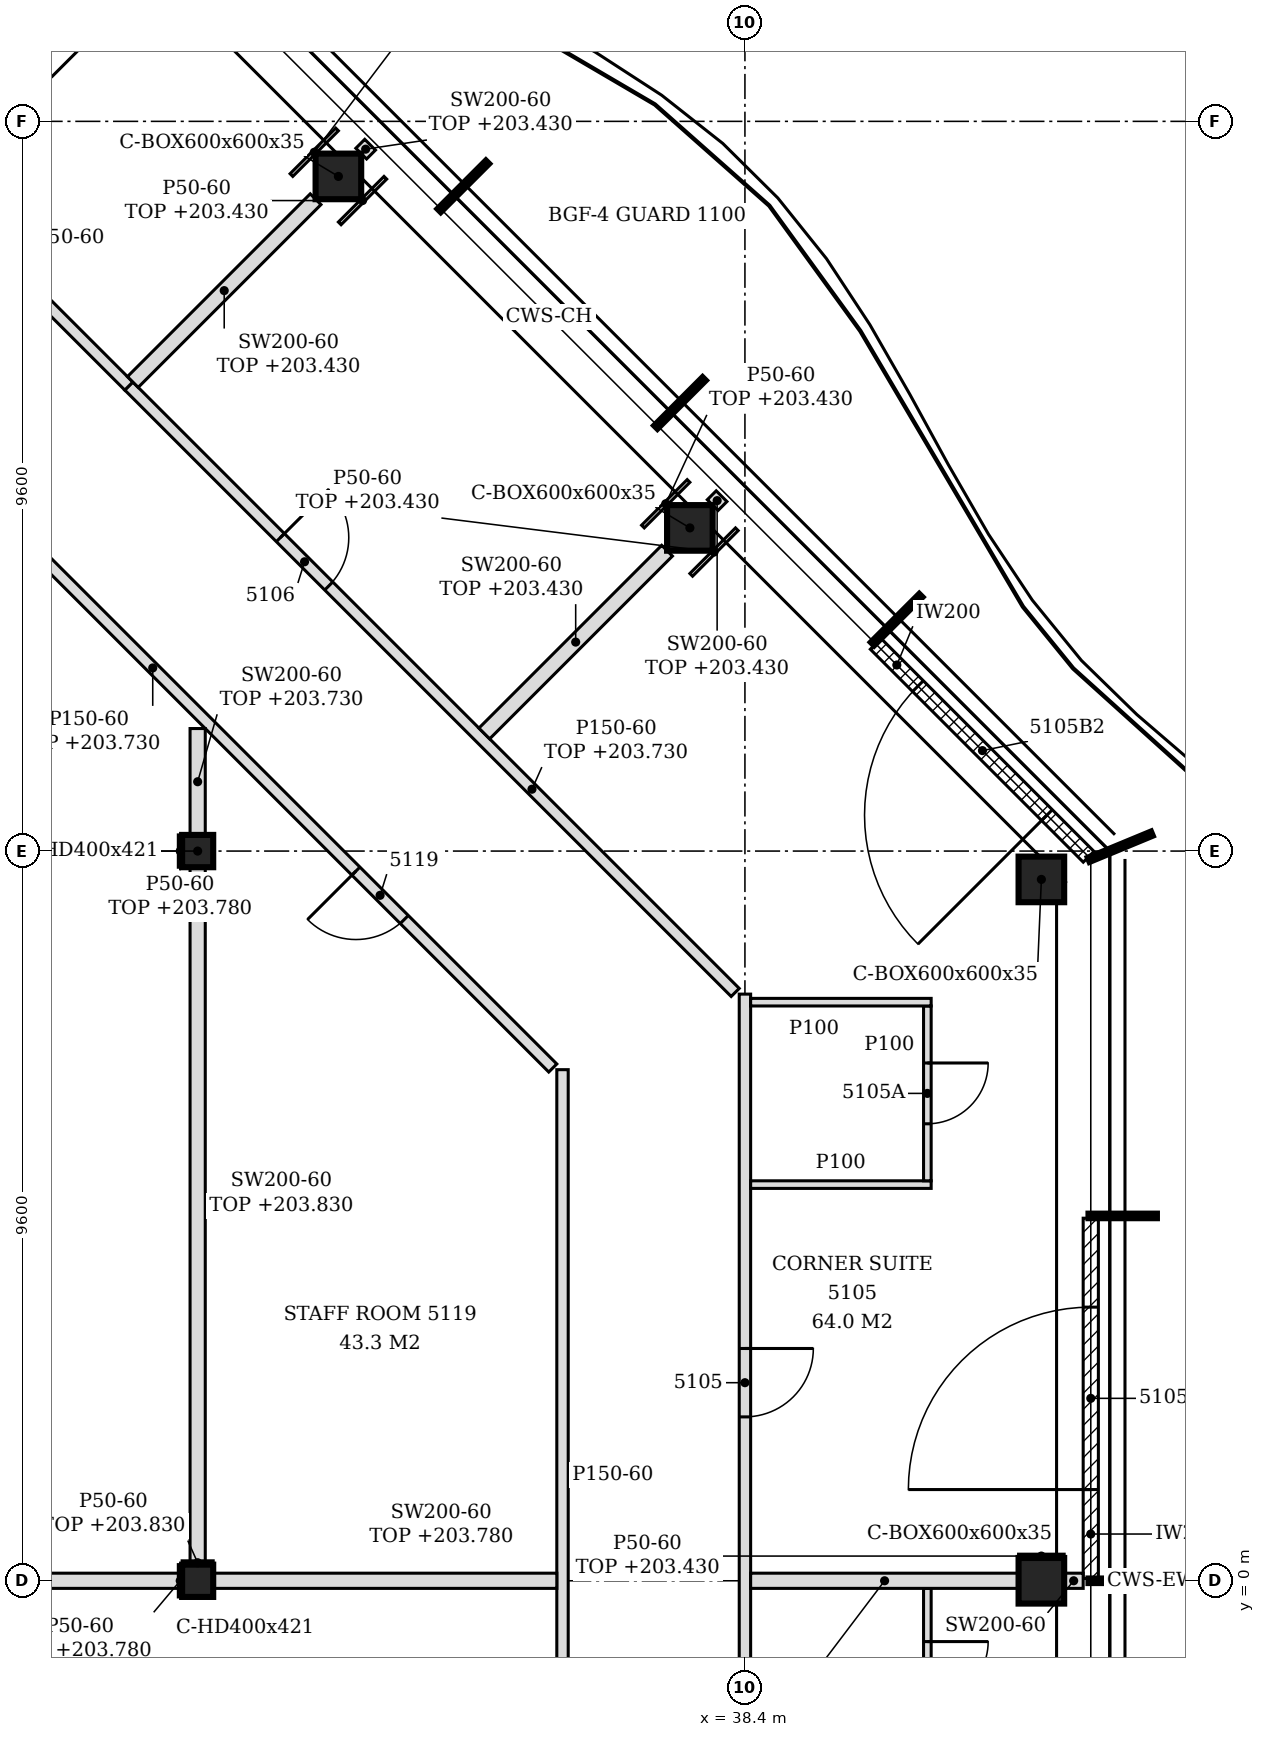
"""IFC4 building model, lengths in metres.
Left out: names, types, materials, properties, quantities, classifications, styles, units other than length and angle.
Written with IfcOpenShell. Run it as: python <this file> out.ifc"""

import sys

from ifc_helpers import new_model, si_unit, direction, frame, frame_2d, origin, origin_2d, place, context, subcontext, project, spatial, polyline, rectangle, hollow_rectangle, i_section, outline, extrude, clip, halfspace, element, fill, save


model = new_model("IFC4")
c1 = context("Model", 3, precision=1e-05, world=origin(), true_north=direction((0.0, 1.0)))
c2 = subcontext(c1, "Body", "Model", "MODEL_VIEW")
j1 = project(units=[si_unit("LENGTHUNIT", "METRE"), si_unit("PLANEANGLEUNIT", "RADIAN")], contexts=[c1])
p1 = place(None, origin())
s1 = spatial("IfcSite", under=j1, at=p1, CompositionType="ELEMENT")
p2 = place(p1, origin())
s2 = spatial("IfcBuilding", under=s1, at=p2, CompositionType="ELEMENT")
p3 = place(p2, frame((0.0, 0.0, 201.0)))
s3 = spatial("IfcBuildingStorey", under=s2, at=p3, CompositionType="ELEMENT", Elevation=201.0)
p4 = place(p3, frame((42.3, 0.0, -0.15), z_axis=(0.0, 0.0, 1.0), x_axis=(1.0, 0.0, 0.0)))
e1 = element("IfcColumn", 1, at=p4, inside=s3, PredefinedType="COLUMN", context=c2, shape_type="Clipping", body=[
    clip(extrude(hollow_rectangle(XDim=0.6, YDim=0.6, WallThickness=0.035, at=origin_2d()), origin(), (0.0, 0.0, 1.0), 3.5), halfspace(frame((0.0, 0.0, 0.011), z_axis=(0.0, 0.0, 1.0), x_axis=(1.0, 0.0, 0.0)), True)),
])
for number, where, z_axis, x_axis in (
    (2, (42.3, 9.227, -0.15), (0.0, 0.0, 1.0), (1.0, 0.0, 0.0)),
    (3, (37.676, 13.852, -0.15), (0.0, 0.0, 1.0), (1.0, 0.0, 0.0)),
    (4, (33.052, 18.476, -0.15), (0.0, 0.0, 1.0), (1.0, 0.0, 0.0)),
):
    element("IfcColumn", number, at=place(p3, frame(where, z_axis=z_axis, x_axis=x_axis)), inside=s3, PredefinedType="COLUMN", context=c2, shape_type="Clipping", body=[
        clip(clip(extrude(hollow_rectangle(XDim=0.6, YDim=0.6, WallThickness=0.035, at=origin_2d()), origin(), (0.0, 0.0, 1.0), 3.5), halfspace(frame((0.0, 0.0, 0.011), z_axis=(0.0, 0.0, 1.0), x_axis=(1.0, 0.0, 0.0)), True)), halfspace(frame((0.0, 0.0, 3.095), z_axis=(0.0, 0.0, 1.0), x_axis=(1.0, 0.0, 0.0)), False)),
    ])
for number, where, z_axis, x_axis in (
    (5, (31.2, 0.0, -0.15), (0.0, 0.0, 1.0), (1.0, 0.0, 0.0)),
    (6, (31.2, 9.6, -0.15), (0.0, 0.0, 1.0), (1.0, 0.0, 0.0)),
):
    element("IfcColumn", number, at=place(p3, frame(where, z_axis=z_axis, x_axis=x_axis)), inside=s3, PredefinedType="COLUMN", context=c2, shape_type="SweptSolid", body=[
        extrude(i_section(OverallWidth=0.409, OverallDepth=0.425, WebThickness=0.033, FlangeThickness=0.052, FilletRadius=0.015, at=origin_2d()), origin(), (0.0, 0.0, 1.0), 3.5),
    ])
p5 = place(p3, frame((42.95, 0.03, 0.0), z_axis=(0.0, 0.0, 1.0), x_axis=(0.0, 1.0, 0.0)))
e7 = element("IfcWall", 7, at=p5, inside=s3, PredefinedType="NOTDEFINED", context=c2, shape_type="SweptSolid", body=[
    extrude(rectangle(XDim=4.74, YDim=0.2, at=frame_2d((2.37, 0.0))), origin(), (0.0, 0.0, 1.0), 3.35),
])
p6 = place(p5, frame((1.17, 0.0, 0.0)))
e8 = element("IfcOpeningElement", 8, at=p6, cuts=e7, PredefinedType="OPENING", context=c2, shape_type="SweptSolid", body=[
    extrude(rectangle(XDim=2.4, YDim=2.4, at=frame_2d((1.2, 1.2))), frame((0.0, 0.11, 0.0), z_axis=(0.0, -1.0, 0.0), x_axis=(1.0, 0.0, 0.0)), (0.0, 0.0, 1.0), 0.22),
])
p7 = place(p3, frame((42.922, 9.525, 0.0), z_axis=(0.0, 0.0, 1.0), x_axis=(-0.707075965734, 0.707137595296, 0.0)))
e9 = element("IfcWall", 9, at=p7, inside=s3, PredefinedType="NOTDEFINED", context=c2, shape_type="SweptSolid", body=[
    extrude(rectangle(XDim=3.961, YDim=0.2, at=frame_2d((1.981, 0.0))), origin(), (0.0, 0.0, 1.0), 3.35),
])
p8 = place(p7, frame((0.775, 0.0, 0.0)))
e10 = element("IfcOpeningElement", 10, at=p8, cuts=e9, PredefinedType="OPENING", context=c2, shape_type="SweptSolid", body=[
    extrude(rectangle(XDim=2.4, YDim=2.4, at=frame_2d((1.2, 1.2))), frame((0.0, 0.11, 0.0), z_axis=(0.0, -1.0, 0.0), x_axis=(1.0, 0.0, 0.0)), (0.0, 0.0, 1.0), 0.22),
])
p9 = place(p3, frame((38.4, -7.431, 0.0), z_axis=(0.0, 0.0, 1.0), x_axis=(0.0, 1.0, 0.0)))
e11 = element("IfcWall", 11, at=p9, inside=s3, PredefinedType="PARTITIONING", context=c2, shape_type="SweptSolid", body=[
    extrude(outline(polyline([(0.0, 0.0), (15.149, 0.0), (15.149, 3.35), (12.336, 3.35), (12.334, 2.78), (12.126, 2.78), (12.124, 3.35), (7.536, 3.35), (7.534, 2.78), (7.326, 2.78), (7.324, 3.35), (2.736, 3.35), (2.734, 2.78), (2.526, 2.78), (2.524, 3.35), (0.0, 3.35), (0.0, 0.0)])), frame((0.0, 0.075, 0.0), z_axis=(0.0, -1.0, 0.0), x_axis=(1.0, 0.0, 0.0)), (0.0, 0.0, 1.0), 0.15),
])
p10 = place(p9, frame((1.975, 0.0, 0.0)))
e12 = element("IfcOpeningElement", 12, at=p10, cuts=e11, PredefinedType="OPENING", context=c2, shape_type="SweptSolid", body=[
    extrude(rectangle(XDim=0.9, YDim=2.1, at=frame_2d((0.45, 1.05))), frame((0.0, 0.085, 0.0), z_axis=(0.0, -1.0, 0.0), x_axis=(1.0, 0.0, 0.0)), (0.0, 0.0, 1.0), 0.17),
])
p11 = place(p9, frame((9.587, 0.0, 0.0)))
e13 = element("IfcOpeningElement", 13, at=p11, cuts=e11, PredefinedType="OPENING", context=c2, shape_type="SweptSolid", body=[
    extrude(rectangle(XDim=0.9, YDim=2.1, at=frame_2d((0.45, 1.05))), frame((0.0, 0.085, 0.0), z_axis=(0.0, -1.0, 0.0), x_axis=(1.0, 0.0, 0.0)), (0.0, 0.0, 1.0), 0.17),
])
p12 = place(p3, frame((36.0, -5.925, 0.0), z_axis=(0.0, 0.0, 1.0), x_axis=(0.0, 1.0, 0.0)))
e14 = element("IfcWall", 14, at=p12, inside=s3, PredefinedType="PARTITIONING", context=c2, shape_type="SweptSolid", body=[
    extrude(outline(polyline([(0.0, 0.0), (12.649, 0.0), (12.649, 3.35), (10.83, 3.35), (10.828, 2.78), (10.62, 2.78), (10.618, 3.35), (6.03, 3.35), (6.028, 2.78), (5.82, 2.78), (5.818, 3.35), (1.23, 3.35), (1.228, 2.78), (1.02, 2.78), (1.018, 3.35), (0.0, 3.35), (0.0, 0.0)])), frame((0.0, 0.075, 0.0), z_axis=(0.0, -1.0, 0.0), x_axis=(1.0, 0.0, 0.0)), (0.0, 0.0, 1.0), 0.15),
])
p13 = place(p12, frame((1.175, 0.0, 0.0)))
e15 = element("IfcOpeningElement", 15, at=p13, cuts=e14, PredefinedType="OPENING", context=c2, shape_type="SweptSolid", body=[
    extrude(rectangle(XDim=0.8, YDim=2.1, at=frame_2d((0.4, 1.05))), frame((0.0, 0.085, 0.0), z_axis=(0.0, -1.0, 0.0), x_axis=(1.0, 0.0, 0.0)), (0.0, 0.0, 1.0), 0.17),
])
p14 = place(p3, frame((40.8, -2.35, 0.0), z_axis=(0.0, 0.0, 1.0), x_axis=(0.0, 1.0, 0.0)))
e16 = element("IfcWall", 16, at=p14, inside=s3, PredefinedType="PARTITIONING", context=c2, shape_type="SweptSolid", body=[
    extrude(outline(polyline([(0.0, 0.0), (2.25, 0.0), (2.25, 2.78), (2.245, 2.78), (2.243, 3.35), (0.0, 3.35), (0.0, 0.0)])), frame((0.0, 0.05, 0.0), z_axis=(0.0, -1.0, 0.0), x_axis=(1.0, 0.0, 0.0)), (0.0, 0.0, 1.0), 0.1),
])
p15 = place(p14, frame((0.75, 0.0, 0.0)))
e17 = element("IfcOpeningElement", 17, at=p15, cuts=e16, PredefinedType="OPENING", context=c2, shape_type="SweptSolid", body=[
    extrude(rectangle(XDim=0.8, YDim=2.1, at=frame_2d((0.4, 1.05))), frame((0.0, 0.06, 0.0), z_axis=(0.0, -1.0, 0.0), x_axis=(1.0, 0.0, 0.0)), (0.0, 0.0, 1.0), 0.12),
])
p16 = place(p3, frame((19.275, 0.0, 0.0), z_axis=(0.0, 0.0, 1.0), x_axis=(1.0, 0.0, 0.0)))
e18 = element("IfcWall", 18, at=p16, inside=s3, PredefinedType="PARTITIONING", context=c2, shape_type="SweptSolid", body=[
    extrude(outline(polyline([(0.0, 0.0), (11.721, 0.0), (11.72, 2.78), (0.076, 2.78), (0.074, 2.322), (0.0, 2.322), (0.0, 0.0)])), frame((0.0, 0.1, 0.0), z_axis=(0.0, -1.0, 0.0), x_axis=(1.0, 0.0, 0.0)), (0.0, 0.0, 1.0), 0.2),
])
p17 = place(p3, frame((31.405, 0.0, 0.0), z_axis=(0.0, 0.0, 1.0), x_axis=(1.0, 0.0, 0.0)))
e19 = element("IfcWall", 19, at=p17, inside=s3, PredefinedType="PARTITIONING", context=c2, shape_type="SweptSolid", body=[
    extrude(rectangle(XDim=4.521, YDim=0.2, at=frame_2d((2.26, 0.0))), origin(), (0.0, 0.0, 1.0), 2.78),
])
p18 = place(p3, frame((38.475, 0.0, 0.0), z_axis=(0.0, 0.0, 1.0), x_axis=(1.0, 0.0, 0.0)))
e20 = element("IfcWall", 20, at=p18, inside=s3, PredefinedType="PARTITIONING", context=c2, shape_type="SweptSolid", body=[
    extrude(outline(polyline([(0.0, 0.0), (3.525, 0.0), (3.525, 2.43), (3.375, 2.43), (3.373, 2.78), (0.0, 2.78), (0.0, 0.0)])), frame((0.0, 0.1, 0.0), z_axis=(0.0, -1.0, 0.0), x_axis=(1.0, 0.0, 0.0)), (0.0, 0.0, 1.0), 0.2),
])
p19 = place(p3, frame((42.6, 0.0, 0.0), z_axis=(0.0, 0.0, 1.0), x_axis=(1.0, 0.0, 0.0)))
e21 = element("IfcWall", 21, at=p19, inside=s3, PredefinedType="PARTITIONING", context=c2, shape_type="SweptSolid", body=[
    extrude(outline(polyline([(0.0, 0.0), (0.25, 0.0), (0.25, 3.35), (0.15, 3.35), (0.148, 2.43), (0.0, 2.43), (0.0, 0.0)])), frame((0.0, 0.1, 0.0), z_axis=(0.0, -1.0, 0.0), x_axis=(1.0, 0.0, 0.0)), (0.0, 0.0, 1.0), 0.2),
])
p20 = place(p3, frame((31.2, 0.212, 0.0), z_axis=(0.0, 0.0, 1.0), x_axis=(0.0, 1.0, 0.0)))
e22 = element("IfcWall", 22, at=p20, inside=s3, PredefinedType="PARTITIONING", context=c2, shape_type="SweptSolid", body=[
    extrude(rectangle(XDim=9.175, YDim=0.2, at=frame_2d((4.587, 0.0))), origin(), (0.0, 0.0, 1.0), 2.83),
])
p21 = place(p3, frame((38.475, 5.212, 0.0), z_axis=(0.0, 0.0, 1.0), x_axis=(1.0, 0.0, 0.0)))
e23 = element("IfcWall", 23, at=p21, inside=s3, PredefinedType="PARTITIONING", context=c2, shape_type="SweptSolid", body=[
    extrude(rectangle(XDim=2.375, YDim=0.1, at=frame_2d((1.188, 0.0))), origin(), (0.0, 0.0, 1.0), 3.35),
])
p22 = place(p3, frame((40.8, 5.262, 0.0), z_axis=(0.0, 0.0, 1.0), x_axis=(0.0, 1.0, 0.0)))
e24 = element("IfcWall", 24, at=p22, inside=s3, PredefinedType="PARTITIONING", context=c2, shape_type="SweptSolid", body=[
    extrude(rectangle(XDim=2.3, YDim=0.1, at=frame_2d((1.15, 0.0))), origin(), (0.0, 0.0, 1.0), 3.35),
])
p23 = place(p22, frame((0.75, 0.0, 0.0)))
e25 = element("IfcOpeningElement", 25, at=p23, cuts=e24, PredefinedType="OPENING", context=c2, shape_type="SweptSolid", body=[
    extrude(rectangle(XDim=0.8, YDim=2.1, at=frame_2d((0.4, 1.05))), frame((0.0, 0.06, 0.0), z_axis=(0.0, -1.0, 0.0), x_axis=(1.0, 0.0, 0.0)), (0.0, 0.0, 1.0), 0.12),
])
p24 = place(p3, frame((35.872, 6.746, 0.0), z_axis=(0.0, 0.0, 1.0), x_axis=(-0.707106781187, 0.707106781187, 0.0)))
e26 = element("IfcWall", 26, at=p24, inside=s3, PredefinedType="PARTITIONING", context=c2, shape_type="SweptSolid", body=[
    extrude(rectangle(XDim=14.038, YDim=0.15, at=frame_2d((7.019, 0.0))), origin(), (0.0, 0.0, 1.0), 2.73),
])
p25 = place(p24, frame((2.763, 0.0, 0.0)))
e27 = element("IfcOpeningElement", 27, at=p25, cuts=e26, PredefinedType="OPENING", context=c2, shape_type="SweptSolid", body=[
    extrude(rectangle(XDim=0.9, YDim=2.1, at=frame_2d((0.45, 1.05))), frame((0.0, 0.085, 0.0), z_axis=(0.0, -1.0, 0.0), x_axis=(1.0, 0.0, 0.0)), (0.0, 0.0, 1.0), 0.17),
])
p26 = place(p24, frame((11.223, 0.0, 0.0)))
e28 = element("IfcOpeningElement", 28, at=p26, cuts=e26, PredefinedType="OPENING", context=c2, shape_type="SweptSolid", body=[
    extrude(rectangle(XDim=0.9, YDim=2.1, at=frame_2d((0.45, 1.05))), frame((0.0, 0.085, 0.0), z_axis=(0.0, -1.0, 0.0), x_axis=(1.0, 0.0, 0.0)), (0.0, 0.0, 1.0), 0.17),
])
p27 = place(p3, frame((38.475, 7.612, 0.0), z_axis=(0.0, 0.0, 1.0), x_axis=(1.0, 0.0, 0.0)))
e29 = element("IfcWall", 29, at=p27, inside=s3, PredefinedType="PARTITIONING", context=c2, shape_type="SweptSolid", body=[
    extrude(rectangle(XDim=2.375, YDim=0.1, at=frame_2d((1.188, 0.0))), origin(), (0.0, 0.0, 1.0), 3.35),
])
p28 = place(p3, frame((38.272, 7.74, 0.0), z_axis=(0.0, 0.0, 1.0), x_axis=(-0.707106781187, 0.707106781187, 0.0)))
e30 = element("IfcWall", 30, at=p28, inside=s3, PredefinedType="PARTITIONING", context=c2, shape_type="SweptSolid", body=[
    extrude(rectangle(XDim=11.283, YDim=0.15, at=frame_2d((5.641, 0.0))), origin(), (0.0, 0.0, 1.0), 2.73),
])
p29 = place(p28, frame((7.562, 0.0, 0.0)))
e31 = element("IfcOpeningElement", 31, at=p29, cuts=e30, PredefinedType="OPENING", context=c2, shape_type="SweptSolid", body=[
    extrude(rectangle(XDim=0.9, YDim=2.1, at=frame_2d((0.45, 1.05))), frame((0.0, 0.085, 0.0), z_axis=(0.0, -1.0, 0.0), x_axis=(1.0, 0.0, 0.0)), (0.0, 0.0, 1.0), 0.17),
])
p30 = place(p3, frame((31.2, 9.812, 0.0), z_axis=(0.0, 0.0, 1.0), x_axis=(0.0, 1.0, 0.0)))
e32 = element("IfcWall", 32, at=p30, inside=s3, PredefinedType="PARTITIONING", context=c2, shape_type="SweptSolid", body=[
    extrude(rectangle(XDim=1.399, YDim=0.2, at=frame_2d((0.7, 0.0))), origin(), (0.0, 0.0, 1.0), 2.73),
])
p31 = place(p3, frame((34.971, 11.147, 0.0), z_axis=(0.0, 0.0, 1.0), x_axis=(0.707106781187, 0.707106781187, 0.0)))
e33 = element("IfcWall", 33, at=p31, inside=s3, PredefinedType="PARTITIONING", context=c2, shape_type="SweptSolid", body=[
    extrude(rectangle(XDim=3.401, YDim=0.2, at=frame_2d((1.7, 0.0))), origin(), (0.0, 0.0, 1.0), 2.43),
])
p32 = place(p3, frame((37.976, 14.152, 0.0), z_axis=(0.0, 0.0, 1.0), x_axis=(0.707106781187, 0.707106781187, 0.0)))
e34 = element("IfcWall", 34, at=p32, inside=s3, PredefinedType="PARTITIONING", context=c2, shape_type="SweptSolid", body=[
    extrude(rectangle(XDim=0.166, YDim=0.2, at=frame_2d((0.083, 0.0))), origin(), (0.0, 0.0, 1.0), 2.43),
])
p33 = place(p3, frame((30.294, 15.718, 0.0), z_axis=(0.0, 0.0, 1.0), x_axis=(-0.707229938335, 0.706983602584, 0.0)))
e35 = element("IfcWall", 35, at=p33, inside=s3, PredefinedType="PARTITIONING", context=c2, shape_type="SweptSolid", body=[
    extrude(rectangle(XDim=3.964, YDim=0.15, at=frame_2d((1.982, 0.0))), origin(), (0.0, 0.0, 1.0), 3.35),
])
p34 = place(p3, frame((30.347, 15.771, 0.0), z_axis=(0.0, 0.0, 1.0), x_axis=(0.707142675843, 0.707070884708, 0.0)))
e36 = element("IfcWall", 36, at=p34, inside=s3, PredefinedType="PARTITIONING", context=c2, shape_type="SweptSolid", body=[
    extrude(rectangle(XDim=3.401, YDim=0.2, at=frame_2d((1.7, 0.0))), origin(), (0.0, 0.0, 1.0), 2.43),
])
p35 = place(p3, frame((33.352, 18.776, 0.0), z_axis=(0.0, 0.0, 1.0), x_axis=(0.707106781187, 0.707106781187, 0.0)))
e37 = element("IfcWall", 37, at=p35, inside=s3, PredefinedType="PARTITIONING", context=c2, shape_type="SweptSolid", body=[
    extrude(rectangle(XDim=0.166, YDim=0.2, at=frame_2d((0.083, 0.0))), origin(), (0.0, 0.0, 1.0), 2.43),
])
p36 = place(p3, frame((30.996, 0.238, 0.0), z_axis=(0.0, 0.0, 1.0), x_axis=(1.0, 0.0, 0.0)))
e38 = element("IfcWall", 38, at=p36, inside=s3, PredefinedType="PARTITIONING", context=c2, shape_type="SweptSolid", body=[
    extrude(rectangle(XDim=0.409, YDim=0.05, at=frame_2d((0.205, 0.0))), origin(), (0.0, 0.0, 1.0), 2.83),
])
p37 = place(p3, frame((42.0, 0.325, 0.0), z_axis=(0.0, 0.0, 1.0), x_axis=(1.0, 0.0, 0.0)))
e39 = element("IfcWall", 39, at=p37, inside=s3, PredefinedType="PARTITIONING", context=c2, shape_type="SweptSolid", body=[
    extrude(rectangle(XDim=0.6, YDim=0.05, at=frame_2d((0.3, 0.0))), origin(), (0.0, 0.0, 1.0), 2.43),
])
p38 = place(p3, frame((30.97, -0.212, 0.0), z_axis=(0.0, 0.0, 1.0), x_axis=(0.0, 1.0, 0.0)))
e40 = element("IfcWall", 40, at=p38, inside=s3, PredefinedType="PARTITIONING", context=c2, shape_type="SweptSolid", body=[
    extrude(rectangle(XDim=0.425, YDim=0.05, at=frame_2d((0.212, 0.0))), origin(), (0.0, 0.0, 1.0), 2.78),
])
p39 = place(p3, frame((30.97, 9.387, 0.0), z_axis=(0.0, 0.0, 1.0), x_axis=(0.0, 1.0, 0.0)))
e41 = element("IfcWall", 41, at=p39, inside=s3, PredefinedType="PARTITIONING", context=c2, shape_type="SweptSolid", body=[
    extrude(rectangle(XDim=0.425, YDim=0.05, at=frame_2d((0.212, 0.0))), origin(), (0.0, 0.0, 1.0), 2.78),
])
for number, where, z_axis, x_axis in (
    (42, (37.058, 13.869, 0.0), (0.0, 0.0, 1.0), (0.707, 0.707, 0.0)),
    (43, (37.693, 13.234, 0.0), (0.0, 0.0, 1.0), (0.707, 0.707, 0.0)),
    (44, (32.434, 18.493, 0.0), (0.0, 0.0, 1.0), (0.707, 0.707, 0.0)),
):
    element("IfcWall", number, at=place(p3, frame(where, z_axis=z_axis, x_axis=x_axis)), inside=s3, PredefinedType="PARTITIONING", context=c2, shape_type="SweptSolid", body=[
        extrude(rectangle(XDim=0.848, YDim=0.05, at=frame_2d((0.424, 0.0))), origin(), (0.0, 0.0, 1.0), 2.43),
    ])
p40 = place(p3, frame((33.069, 17.858, 0.0), z_axis=(0.0, 0.0, 1.0), x_axis=(0.707106781187, 0.707106781187, 0.0)))
e45 = element("IfcWall", 45, at=p40, inside=s3, PredefinedType="PARTITIONING", context=c2, shape_type="SweptSolid", body=[
    extrude(rectangle(XDim=0.849, YDim=0.05, at=frame_2d((0.424, 0.0))), origin(), (0.0, 0.0, 1.0), 2.43),
])
p41 = place(p6, origin())
e46 = element("IfcDoor", 46, at=p41, inside=s3, OperationType="SINGLE_SWING_LEFT", PredefinedType="DOOR", context=c2, shape_type="SweptSolid", body=[
    extrude(rectangle(XDim=2.4, YDim=2.4, at=frame_2d((1.2, 1.2))), frame((0.0, 0.025, 0.0), z_axis=(0.0, -1.0, 0.0), x_axis=(1.0, 0.0, 0.0)), (0.0, 0.0, 1.0), 0.05),
])
fill(e8, e46)
p42 = place(p8, origin())
e47 = element("IfcDoor", 47, at=p42, inside=s3, OperationType="SINGLE_SWING_LEFT", PredefinedType="DOOR", context=c2, shape_type="SweptSolid", body=[
    extrude(rectangle(XDim=2.4, YDim=2.4, at=frame_2d((1.2, 1.2))), frame((0.0, 0.025, 0.0), z_axis=(0.0, -1.0, 0.0), x_axis=(1.0, 0.0, 0.0)), (0.0, 0.0, 1.0), 0.05),
])
fill(e10, e47)
p43 = place(p15, frame((0.8, 0.0, 0.0), z_axis=(0.0, 0.0, 1.0), x_axis=(-1.0, 0.0, 0.0)))
e48 = element("IfcDoor", 48, at=p43, inside=s3, OperationType="SINGLE_SWING_LEFT", PredefinedType="DOOR", context=c2, shape_type="SweptSolid", body=[
    extrude(rectangle(XDim=0.8, YDim=2.1, at=frame_2d((0.4, 1.05))), frame((0.0, 0.025, 0.0), z_axis=(0.0, -1.0, 0.0), x_axis=(1.0, 0.0, 0.0)), (0.0, 0.0, 1.0), 0.05),
])
fill(e17, e48)
p44 = place(p11, frame((0.9, 0.0, 0.0), z_axis=(0.0, 0.0, 1.0), x_axis=(-1.0, 0.0, 0.0)))
e49 = element("IfcDoor", 49, at=p44, inside=s3, OperationType="SINGLE_SWING_LEFT", PredefinedType="DOOR", context=c2, shape_type="SweptSolid", body=[
    extrude(rectangle(XDim=0.9, YDim=2.1, at=frame_2d((0.45, 1.05))), frame((0.0, 0.025, 0.0), z_axis=(0.0, -1.0, 0.0), x_axis=(1.0, 0.0, 0.0)), (0.0, 0.0, 1.0), 0.05),
])
fill(e13, e49)
p45 = place(p23, frame((0.8, 0.0, 0.0), z_axis=(0.0, 0.0, 1.0), x_axis=(-1.0, 0.0, 0.0)))
e50 = element("IfcDoor", 50, at=p45, inside=s3, OperationType="SINGLE_SWING_LEFT", PredefinedType="DOOR", context=c2, shape_type="SweptSolid", body=[
    extrude(rectangle(XDim=0.8, YDim=2.1, at=frame_2d((0.4, 1.05))), frame((0.0, 0.025, 0.0), z_axis=(0.0, -1.0, 0.0), x_axis=(1.0, 0.0, 0.0)), (0.0, 0.0, 1.0), 0.05),
])
fill(e25, e50)
p46 = place(p29, frame((0.9, 0.0, 0.0), z_axis=(0.0, 0.0, 1.0), x_axis=(-1.0, 0.0, 0.0)))
e51 = element("IfcDoor", 51, at=p46, inside=s3, OperationType="SINGLE_SWING_LEFT", PredefinedType="DOOR", context=c2, shape_type="SweptSolid", body=[
    extrude(rectangle(XDim=0.9, YDim=2.1, at=frame_2d((0.45, 1.05))), frame((0.0, 0.025, 0.0), z_axis=(0.0, -1.0, 0.0), x_axis=(1.0, 0.0, 0.0)), (0.0, 0.0, 1.0), 0.05),
])
fill(e31, e51)
p47 = place(p25, origin())
e52 = element("IfcDoor", 52, at=p47, inside=s3, OperationType="SINGLE_SWING_RIGHT", PredefinedType="DOOR", context=c2, shape_type="SweptSolid", body=[
    extrude(rectangle(XDim=0.9, YDim=2.1, at=frame_2d((0.45, 1.05))), frame((0.0, 0.025, 0.0), z_axis=(0.0, -1.0, 0.0), x_axis=(1.0, 0.0, 0.0)), (0.0, 0.0, 1.0), 0.05),
])
fill(e27, e52)
save(model, sys.argv[1])
